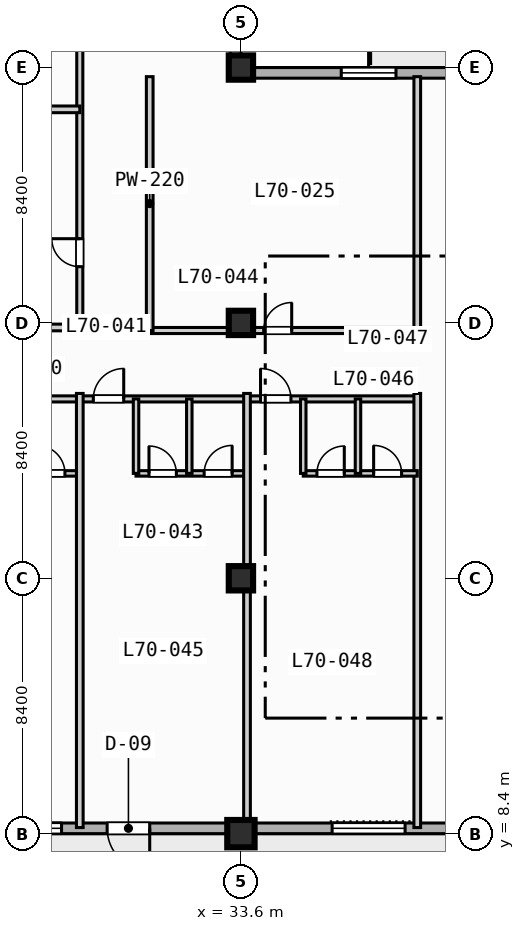
"""IFC4 building model, lengths in metres.
Left out: names, types, materials, properties, quantities, classifications, styles, units other than length and angle.
Written with IfcOpenShell. Run it as: python <this file> out.ifc"""

import sys

from ifc_helpers import new_model, si_unit, direction, frame, frame_2d, origin, origin_2d, place, context, subcontext, project, spatial, rectangle, extrude, element, fill, save


model = new_model("IFC4")
c1 = context("Model", 3, precision=1e-05, world=origin(), true_north=direction((0.0, 1.0)))
c2 = subcontext(c1, "Body", "Model", "MODEL_VIEW")
j1 = project(units=[si_unit("LENGTHUNIT", "METRE"), si_unit("PLANEANGLEUNIT", "RADIAN")], contexts=[c1])
p1 = place(None, origin())
s1 = spatial("IfcSite", under=j1, at=p1, CompositionType="ELEMENT")
p2 = place(p1, origin())
s2 = spatial("IfcBuilding", under=s1, at=p2, CompositionType="ELEMENT")
p3 = place(p2, frame((0.0, 0.0, 282.3)))
s3 = spatial("IfcBuildingStorey", under=s2, at=p3, CompositionType="ELEMENT", Elevation=282.3)
p4 = place(p3, frame((33.6, 8.4, 0.0), z_axis=(0.0, 0.0, 1.0), x_axis=(1.0, 0.0, 0.0)))
e1 = element("IfcColumn", 1, at=p4, inside=s3, PredefinedType="COLUMN", context=c2, shape_type="SweptSolid", body=[
    extrude(rectangle(XDim=0.9, YDim=0.9, at=origin_2d()), origin(), (0.0, 0.0, 1.0), 3.7),
])
for number, where, z_axis, x_axis in (
    (2, (33.6, 16.8, 0.0), (0.0, 0.0, 1.0), (1.0, 0.0, 0.0)),
    (3, (33.6, 25.2, 0.0), (0.0, 0.0, 1.0), (1.0, 0.0, 0.0)),
    (4, (33.6, 33.6, 0.0), (0.0, 0.0, 1.0), (1.0, 0.0, 0.0)),
):
    element("IfcColumn", number, at=place(p3, frame(where, z_axis=z_axis, x_axis=x_axis)), inside=s3, PredefinedType="COLUMN", context=c2, shape_type="SweptSolid", body=[
        extrude(rectangle(XDim=0.8, YDim=0.8, at=origin_2d()), origin(), (0.0, 0.0, 1.0), 3.7),
    ])
p5 = place(p3, frame((33.425, 72.425, 0.0), z_axis=(0.0, 0.0, 1.0), x_axis=(0.0, -1.0, 0.0)))
e5 = element("IfcWall", 5, at=p5, inside=s3, PredefinedType="STANDARD", context=c2, shape_type="SweptSolid", body=[
    extrude(rectangle(XDim=39.0, YDim=0.35, at=frame_2d((19.5, 0.0))), origin(), (0.0, 0.0, 1.0), 3.47),
])
p6 = place(p5, frame((5.9, 0.0, 0.85)))
e6 = element("IfcOpeningElement", 6, at=p6, cuts=e5, PredefinedType="OPENING", context=c2, shape_type="SweptSolid", body=[
    extrude(rectangle(XDim=1.8, YDim=1.8, at=frame_2d((0.9, 0.9))), frame((0.0, 0.185, 0.0), z_axis=(0.0, -1.0, 0.0), x_axis=(1.0, 0.0, 0.0)), (0.0, 0.0, 1.0), 0.37),
])
p7 = place(p3, frame((33.425, 33.425, 0.0), z_axis=(0.0, 0.0, 1.0), x_axis=(1.0, 0.0, 0.0)))
e7 = element("IfcWall", 7, at=p7, inside=s3, PredefinedType="STANDARD", context=c2, shape_type="SweptSolid", body=[
    extrude(rectangle(XDim=39.0, YDim=0.35, at=frame_2d((19.5, 0.0))), origin(), (0.0, 0.0, 1.0), 3.47),
])
p8 = place(p7, frame((12.075, 0.0, 0.0)))
e8 = element("IfcOpeningElement", 8, at=p8, cuts=e7, PredefinedType="OPENING", context=c2, shape_type="SweptSolid", body=[
    extrude(rectangle(XDim=1.4, YDim=2.2, at=frame_2d((0.7, 1.1))), frame((0.0, 0.185, 0.0), z_axis=(0.0, -1.0, 0.0), x_axis=(1.0, 0.0, 0.0)), (0.0, 0.0, 1.0), 0.37),
])
p9 = place(p7, frame((3.475, 0.0, 0.85)))
e9 = element("IfcOpeningElement", 9, at=p9, cuts=e7, PredefinedType="OPENING", context=c2, shape_type="SweptSolid", body=[
    extrude(rectangle(XDim=1.8, YDim=1.8, at=frame_2d((0.9, 0.9))), frame((0.0, 0.185, 0.0), z_axis=(0.0, -1.0, 0.0), x_axis=(1.0, 0.0, 0.0)), (0.0, 0.0, 1.0), 0.37),
])
p10 = place(p3, frame((72.425, 8.575, 0.0), z_axis=(0.0, 0.0, 1.0), x_axis=(-1.0, 0.0, 0.0)))
e10 = element("IfcWall", 10, at=p10, inside=s3, PredefinedType="STANDARD", context=c2, shape_type="SweptSolid", body=[
    extrude(rectangle(XDim=60.85, YDim=0.35, at=frame_2d((30.425, 0.0))), origin(), (0.0, 0.0, 1.0), 3.47),
])
p11 = place(p10, frame((41.825, 0.0, 0.0)))
e11 = element("IfcOpeningElement", 11, at=p11, cuts=e10, PredefinedType="OPENING", context=c2, shape_type="SweptSolid", body=[
    extrude(rectangle(XDim=1.4, YDim=2.2, at=frame_2d((0.7, 1.1))), frame((0.0, 0.185, 0.0), z_axis=(0.0, -1.0, 0.0), x_axis=(1.0, 0.0, 0.0)), (0.0, 0.0, 1.0), 0.37),
])
p12 = place(p10, frame((50.225, 0.0, 0.85)))
e12 = element("IfcOpeningElement", 12, at=p12, cuts=e10, PredefinedType="OPENING", context=c2, shape_type="SweptSolid", body=[
    extrude(rectangle(XDim=2.4, YDim=1.95, at=frame_2d((1.2, 0.975))), frame((0.0, 0.185, 0.0), z_axis=(0.0, -1.0, 0.0), x_axis=(1.0, 0.0, 0.0)), (0.0, 0.0, 1.0), 0.37),
])
p13 = place(p10, frame((33.425, 0.0, 0.85)))
e13 = element("IfcOpeningElement", 13, at=p13, cuts=e10, PredefinedType="OPENING", context=c2, shape_type="SweptSolid", body=[
    extrude(rectangle(XDim=2.4, YDim=1.95, at=frame_2d((1.2, 0.975))), frame((0.0, 0.185, 0.0), z_axis=(0.0, -1.0, 0.0), x_axis=(1.0, 0.0, 0.0)), (0.0, 0.0, 1.0), 0.37),
])
p14 = place(p10, frame((25.325, 0.0, 0.85)))
e14 = element("IfcOpeningElement", 14, at=p14, cuts=e10, PredefinedType="OPENING", context=c2, shape_type="SweptSolid", body=[
    extrude(rectangle(XDim=1.8, YDim=1.8, at=frame_2d((0.9, 0.9))), frame((0.0, 0.185, 0.0), z_axis=(0.0, -1.0, 0.0), x_axis=(1.0, 0.0, 0.0)), (0.0, 0.0, 1.0), 0.37),
])
p15 = place(p10, frame((56.975, 0.0, 0.85)))
e15 = element("IfcOpeningElement", 15, at=p15, cuts=e10, PredefinedType="OPENING", context=c2, shape_type="SweptSolid", body=[
    extrude(rectangle(XDim=1.8, YDim=1.8, at=frame_2d((0.9, 0.9))), frame((0.0, 0.185, 0.0), z_axis=(0.0, -1.0, 0.0), x_axis=(1.0, 0.0, 0.0)), (0.0, 0.0, 1.0), 0.37),
])
p16 = place(p10, frame((44.725, 0.0, 0.85)))
e16 = element("IfcOpeningElement", 16, at=p16, cuts=e10, PredefinedType="OPENING", context=c2, shape_type="SweptSolid", body=[
    extrude(rectangle(XDim=1.8, YDim=1.8, at=frame_2d((0.9, 0.9))), frame((0.0, 0.185, 0.0), z_axis=(0.0, -1.0, 0.0), x_axis=(1.0, 0.0, 0.0)), (0.0, 0.0, 1.0), 0.37),
])
p17 = place(p3, frame((30.6, 24.95, 0.0), z_axis=(0.0, 0.0, 1.0), x_axis=(1.0, 0.0, 0.0)))
e17 = element("IfcWall", 17, at=p17, inside=s3, PredefinedType="PARTITIONING", context=c2, shape_type="SweptSolid", body=[
    extrude(rectangle(XDim=8.8, YDim=0.2, at=frame_2d((4.4, 0.0))), origin(), (0.0, 0.0, 1.0), 2.87),
])
p18 = place(p17, frame((3.75, 0.0, 0.0)))
e18 = element("IfcOpeningElement", 18, at=p18, cuts=e17, PredefinedType="OPENING", context=c2, shape_type="SweptSolid", body=[
    extrude(rectangle(XDim=0.92, YDim=2.1, at=frame_2d((0.46, 1.05))), frame((0.0, 0.11, 0.0), z_axis=(0.0, -1.0, 0.0), x_axis=(1.0, 0.0, 0.0)), (0.0, 0.0, 1.0), 0.22),
])
for number, where, z_axis, x_axis in (
    (19, (30.6, 24.95, 0.0), (0.0, 0.0, 1.0), (0.0, 1.0, 0.0)),
    (20, (39.4, 24.95, 0.0), (0.0, 0.0, 1.0), (0.0, 1.0, 0.0)),
):
    element("IfcWall", number, at=place(p3, frame(where, z_axis=z_axis, x_axis=x_axis)), inside=s3, PredefinedType="PARTITIONING", context=c2, shape_type="SweptSolid", body=[
        extrude(rectangle(XDim=8.35, YDim=0.22, at=frame_2d((4.175, 0.0))), origin(), (0.0, 0.0, 1.0), 3.47),
    ])
p19 = place(p3, frame((11.8, 22.7, 0.0), z_axis=(0.0, 0.0, 1.0), x_axis=(1.0, 0.0, 0.0)))
e21 = element("IfcWall", 21, at=p19, inside=s3, PredefinedType="PARTITIONING", context=c2, shape_type="SweptSolid", body=[
    extrude(rectangle(XDim=27.6, YDim=0.2, at=frame_2d((13.8, 0.0))), origin(), (0.0, 0.0, 1.0), 3.47),
])
p20 = place(p19, frame((0.445, 0.0, 0.0)))
e22 = element("IfcOpeningElement", 22, at=p20, cuts=e21, PredefinedType="OPENING", context=c2, shape_type="SweptSolid", body=[
    extrude(rectangle(XDim=1.0, YDim=2.15, at=frame_2d((0.5, 1.075))), frame((0.0, 0.11, 0.0), z_axis=(0.0, -1.0, 0.0), x_axis=(1.0, 0.0, 0.0)), (0.0, 0.0, 1.0), 0.22),
])
p21 = place(p19, frame((5.945, 0.0, 0.0)))
e23 = element("IfcOpeningElement", 23, at=p21, cuts=e21, PredefinedType="OPENING", context=c2, shape_type="SweptSolid", body=[
    extrude(rectangle(XDim=1.0, YDim=2.15, at=frame_2d((0.5, 1.075))), frame((0.0, 0.11, 0.0), z_axis=(0.0, -1.0, 0.0), x_axis=(1.0, 0.0, 0.0)), (0.0, 0.0, 1.0), 0.22),
])
p22 = place(p19, frame((11.445, 0.0, 0.0)))
e24 = element("IfcOpeningElement", 24, at=p22, cuts=e21, PredefinedType="OPENING", context=c2, shape_type="SweptSolid", body=[
    extrude(rectangle(XDim=1.0, YDim=2.15, at=frame_2d((0.5, 1.075))), frame((0.0, 0.11, 0.0), z_axis=(0.0, -1.0, 0.0), x_axis=(1.0, 0.0, 0.0)), (0.0, 0.0, 1.0), 0.22),
])
p23 = place(p19, frame((16.945, 0.0, 0.0)))
e25 = element("IfcOpeningElement", 25, at=p23, cuts=e21, PredefinedType="OPENING", context=c2, shape_type="SweptSolid", body=[
    extrude(rectangle(XDim=1.0, YDim=2.15, at=frame_2d((0.5, 1.075))), frame((0.0, 0.11, 0.0), z_axis=(0.0, -1.0, 0.0), x_axis=(1.0, 0.0, 0.0)), (0.0, 0.0, 1.0), 0.22),
])
p24 = place(p19, frame((22.445, 0.0, 0.0)))
e26 = element("IfcOpeningElement", 26, at=p24, cuts=e21, PredefinedType="OPENING", context=c2, shape_type="SweptSolid", body=[
    extrude(rectangle(XDim=1.0, YDim=2.15, at=frame_2d((0.5, 1.075))), frame((0.0, 0.11, 0.0), z_axis=(0.0, -1.0, 0.0), x_axis=(1.0, 0.0, 0.0)), (0.0, 0.0, 1.0), 0.22),
])
p25 = place(p3, frame((24.65, 20.25, 0.0), z_axis=(0.0, 0.0, 1.0), x_axis=(1.0, 0.0, 0.0)))
e27 = element("IfcWall", 27, at=p25, inside=s3, PredefinedType="PLUMBINGWALL", context=c2, shape_type="SweptSolid", body=[
    extrude(rectangle(XDim=3.65, YDim=0.18, at=frame_2d((1.825, 0.0))), origin(), (0.0, 0.0, 1.0), 3.47),
])
p26 = place(p25, frame((0.426, 0.0, 0.0)))
e28 = element("IfcOpeningElement", 28, at=p26, cuts=e27, PredefinedType="OPENING", context=c2, shape_type="SweptSolid", body=[
    extrude(rectangle(XDim=0.9, YDim=2.1, at=frame_2d((0.45, 1.05))), frame((0.0, 0.1, 0.0), z_axis=(0.0, -1.0, 0.0), x_axis=(1.0, 0.0, 0.0)), (0.0, 0.0, 1.0), 0.2),
])
p27 = place(p25, frame((2.241, 0.0, 0.0)))
e29 = element("IfcOpeningElement", 29, at=p27, cuts=e27, PredefinedType="OPENING", context=c2, shape_type="SweptSolid", body=[
    extrude(rectangle(XDim=0.92, YDim=2.1, at=frame_2d((0.46, 1.05))), frame((0.0, 0.1, 0.0), z_axis=(0.0, -1.0, 0.0), x_axis=(1.0, 0.0, 0.0)), (0.0, 0.0, 1.0), 0.2),
])
p28 = place(p3, frame((28.3, 8.6, 0.0), z_axis=(0.0, 0.0, 1.0), x_axis=(0.0, 1.0, 0.0)))
e30 = element("IfcWall", 30, at=p28, inside=s3, PredefinedType="PARTITIONING", context=c2, shape_type="SweptSolid", body=[
    extrude(rectangle(XDim=14.28, YDim=0.22, at=frame_2d((7.14, 0.0))), origin(), (0.0, 0.0, 1.0), 3.47),
])
p29 = place(p3, frame((30.15, 20.25, 0.0), z_axis=(0.0, 0.0, 1.0), x_axis=(1.0, 0.0, 0.0)))
e31 = element("IfcWall", 31, at=p29, inside=s3, PredefinedType="PLUMBINGWALL", context=c2, shape_type="SweptSolid", body=[
    extrude(rectangle(XDim=3.65, YDim=0.18, at=frame_2d((1.825, 0.0))), origin(), (0.0, 0.0, 1.0), 3.47),
])
p30 = place(p29, frame((0.426, 0.0, 0.0)))
e32 = element("IfcOpeningElement", 32, at=p30, cuts=e31, PredefinedType="OPENING", context=c2, shape_type="SweptSolid", body=[
    extrude(rectangle(XDim=0.9, YDim=2.1, at=frame_2d((0.45, 1.05))), frame((0.0, 0.1, 0.0), z_axis=(0.0, -1.0, 0.0), x_axis=(1.0, 0.0, 0.0)), (0.0, 0.0, 1.0), 0.2),
])
p31 = place(p29, frame((2.241, 0.0, 0.0)))
e33 = element("IfcOpeningElement", 33, at=p31, cuts=e31, PredefinedType="OPENING", context=c2, shape_type="SweptSolid", body=[
    extrude(rectangle(XDim=0.92, YDim=2.1, at=frame_2d((0.46, 1.05))), frame((0.0, 0.1, 0.0), z_axis=(0.0, -1.0, 0.0), x_axis=(1.0, 0.0, 0.0)), (0.0, 0.0, 1.0), 0.2),
])
for number, where, z_axis, x_axis in (
    (34, (30.15, 20.25, 0.0), (0.0, 0.0, 1.0), (0.0, 1.0, 0.0)),
    (35, (31.902, 20.25, 0.0), (0.0, 0.0, 1.0), (0.0, 1.0, 0.0)),
):
    element("IfcWall", number, at=place(p3, frame(where, z_axis=z_axis, x_axis=x_axis)), inside=s3, PredefinedType="PLUMBINGWALL", context=c2, shape_type="SweptSolid", body=[
        extrude(rectangle(XDim=2.45, YDim=0.18, at=frame_2d((1.225, 0.0))), origin(), (0.0, 0.0, 1.0), 3.47),
    ])
p32 = place(p3, frame((33.8, 8.6, 0.0), z_axis=(0.0, 0.0, 1.0), x_axis=(0.0, 1.0, 0.0)))
e36 = element("IfcWall", 36, at=p32, inside=s3, PredefinedType="PARTITIONING", context=c2, shape_type="SweptSolid", body=[
    extrude(rectangle(XDim=14.28, YDim=0.22, at=frame_2d((7.14, 0.0))), origin(), (0.0, 0.0, 1.0), 2.87),
])
p33 = place(p3, frame((39.4, 8.6, 0.0), z_axis=(0.0, 0.0, 1.0), x_axis=(0.0, 1.0, 0.0)))
e37 = element("IfcWall", 37, at=p33, inside=s3, PredefinedType="PARTITIONING", context=c2, shape_type="SweptSolid", body=[
    extrude(rectangle(XDim=14.28, YDim=0.22, at=frame_2d((7.14, 0.0))), origin(), (0.0, 0.0, 1.0), 3.47),
])
p34 = place(p3, frame((35.65, 20.25, 0.0), z_axis=(0.0, 0.0, 1.0), x_axis=(1.0, 0.0, 0.0)))
e38 = element("IfcWall", 38, at=p34, inside=s3, PredefinedType="PLUMBINGWALL", context=c2, shape_type="SweptSolid", body=[
    extrude(rectangle(XDim=3.75, YDim=0.18, at=frame_2d((1.875, 0.0))), origin(), (0.0, 0.0, 1.0), 3.47),
])
p35 = place(p34, frame((0.45, 0.0, 0.0)))
e39 = element("IfcOpeningElement", 39, at=p35, cuts=e38, PredefinedType="OPENING", context=c2, shape_type="SweptSolid", body=[
    extrude(rectangle(XDim=0.9, YDim=2.1, at=frame_2d((0.45, 1.05))), frame((0.0, 0.1, 0.0), z_axis=(0.0, -1.0, 0.0), x_axis=(1.0, 0.0, 0.0)), (0.0, 0.0, 1.0), 0.2),
])
p36 = place(p34, frame((2.315, 0.0, 0.0)))
e40 = element("IfcOpeningElement", 40, at=p36, cuts=e38, PredefinedType="OPENING", context=c2, shape_type="SweptSolid", body=[
    extrude(rectangle(XDim=0.92, YDim=2.1, at=frame_2d((0.46, 1.05))), frame((0.0, 0.1, 0.0), z_axis=(0.0, -1.0, 0.0), x_axis=(1.0, 0.0, 0.0)), (0.0, 0.0, 1.0), 0.2),
])
for number, where, z_axis, x_axis in (
    (41, (35.65, 20.25, 0.0), (0.0, 0.0, 1.0), (0.0, 1.0, 0.0)),
    (42, (37.45, 20.25, 0.0), (0.0, 0.0, 1.0), (0.0, 1.0, 0.0)),
):
    element("IfcWall", number, at=place(p3, frame(where, z_axis=z_axis, x_axis=x_axis)), inside=s3, PredefinedType="PLUMBINGWALL", context=c2, shape_type="SweptSolid", body=[
        extrude(rectangle(XDim=2.45, YDim=0.18, at=frame_2d((1.225, 0.0))), origin(), (0.0, 0.0, 1.0), 3.47),
    ])
p37 = place(p3, frame((28.3, 25.05, 0.0), z_axis=(0.0, 0.0, 1.0), x_axis=(0.0, 1.0, 0.0)))
e43 = element("IfcWall", 43, at=p37, inside=s3, PredefinedType="PARTITIONING", context=c2, shape_type="SweptSolid", body=[
    extrude(rectangle(XDim=14.35, YDim=0.2, at=frame_2d((7.175, 0.0))), origin(), (0.0, 0.0, 1.0), 3.47),
])
p38 = place(p37, frame((2.0, 0.0, 0.0)))
e44 = element("IfcOpeningElement", 44, at=p38, cuts=e43, PredefinedType="OPENING", context=c2, shape_type="SweptSolid", body=[
    extrude(rectangle(XDim=0.92, YDim=2.1, at=frame_2d((0.46, 1.05))), frame((0.0, 0.11, 0.0), z_axis=(0.0, -1.0, 0.0), x_axis=(1.0, 0.0, 0.0)), (0.0, 0.0, 1.0), 0.22),
])
p39 = place(p37, frame((9.175, 0.0, 0.0)))
e45 = element("IfcOpeningElement", 45, at=p39, cuts=e43, PredefinedType="OPENING", context=c2, shape_type="SweptSolid", body=[
    extrude(rectangle(XDim=0.92, YDim=2.1, at=frame_2d((0.46, 1.05))), frame((0.0, 0.11, 0.0), z_axis=(0.0, -1.0, 0.0), x_axis=(1.0, 0.0, 0.0)), (0.0, 0.0, 1.0), 0.22),
])
p40 = place(p3, frame((8.7, 25.05, 0.0), z_axis=(0.0, 0.0, 1.0), x_axis=(1.0, 0.0, 0.0)))
e46 = element("IfcWall", 46, at=p40, inside=s3, PredefinedType="PARTITIONING", context=c2, shape_type="SweptSolid", body=[
    extrude(rectangle(XDim=19.6, YDim=0.22, at=frame_2d((9.8, 0.0))), origin(), (0.0, 0.0, 1.0), 2.87),
])
p41 = place(p3, frame((8.7, 32.225, 0.0), z_axis=(0.0, 0.0, 1.0), x_axis=(1.0, 0.0, 0.0)))
e47 = element("IfcWall", 47, at=p41, inside=s3, PredefinedType="PARTITIONING", context=c2, shape_type="SweptSolid", body=[
    extrude(rectangle(XDim=19.6, YDim=0.22, at=frame_2d((9.8, 0.0))), origin(), (0.0, 0.0, 1.0), 3.47),
])
p42 = place(p9, origin())
e48 = element("IfcWindow", 48, at=p42, inside=s3, PartitioningType="SINGLE_PANEL", PredefinedType="WINDOW", context=c2, shape_type="SweptSolid", body=[
    extrude(rectangle(XDim=1.8, YDim=1.8, at=frame_2d((0.9, 0.9))), frame((0.0, 0.03, 0.0), z_axis=(0.0, -1.0, 0.0), x_axis=(1.0, 0.0, 0.0)), (0.0, 0.0, 1.0), 0.06),
])
fill(e9, e48)
p43 = place(p11, origin())
e49 = element("IfcDoor", 49, at=p43, inside=s3, OperationType="SINGLE_SWING_LEFT", PredefinedType="DOOR", context=c2, shape_type="SweptSolid", body=[
    extrude(rectangle(XDim=1.4, YDim=2.2, at=frame_2d((0.7, 1.1))), frame((0.0, 0.025, 0.0), z_axis=(0.0, -1.0, 0.0), x_axis=(1.0, 0.0, 0.0)), (0.0, 0.0, 1.0), 0.05),
])
fill(e11, e49)
p44 = place(p13, origin())
e50 = element("IfcWindow", 50, at=p44, inside=s3, PartitioningType="SINGLE_PANEL", PredefinedType="WINDOW", context=c2, shape_type="SweptSolid", body=[
    extrude(rectangle(XDim=2.4, YDim=1.95, at=frame_2d((1.2, 0.975))), frame((0.0, 0.03, 0.0), z_axis=(0.0, -1.0, 0.0), x_axis=(1.0, 0.0, 0.0)), (0.0, 0.0, 1.0), 0.06),
])
fill(e13, e50)
p45 = place(p16, origin())
e51 = element("IfcWindow", 51, at=p45, inside=s3, PartitioningType="SINGLE_PANEL", PredefinedType="WINDOW", context=c2, shape_type="SweptSolid", body=[
    extrude(rectangle(XDim=1.8, YDim=1.8, at=frame_2d((0.9, 0.9))), frame((0.0, 0.03, 0.0), z_axis=(0.0, -1.0, 0.0), x_axis=(1.0, 0.0, 0.0)), (0.0, 0.0, 1.0), 0.06),
])
fill(e16, e51)
p46 = place(p18, origin())
e52 = element("IfcDoor", 52, at=p46, inside=s3, OperationType="SINGLE_SWING_RIGHT", PredefinedType="DOOR", context=c2, shape_type="SweptSolid", body=[
    extrude(rectangle(XDim=0.92, YDim=2.1, at=frame_2d((0.46, 1.05))), frame((0.0, 0.025, 0.0), z_axis=(0.0, -1.0, 0.0), x_axis=(1.0, 0.0, 0.0)), (0.0, 0.0, 1.0), 0.05),
])
fill(e18, e52)
p47 = place(p23, origin())
e53 = element("IfcDoor", 53, at=p47, inside=s3, OperationType="SINGLE_SWING_RIGHT", PredefinedType="DOOR", context=c2, shape_type="SweptSolid", body=[
    extrude(rectangle(XDim=1.0, YDim=2.15, at=frame_2d((0.5, 1.075))), frame((0.0, 0.025, 0.0), z_axis=(0.0, -1.0, 0.0), x_axis=(1.0, 0.0, 0.0)), (0.0, 0.0, 1.0), 0.05),
])
fill(e25, e53)
p48 = place(p24, origin())
e54 = element("IfcDoor", 54, at=p48, inside=s3, OperationType="SINGLE_SWING_LEFT", PredefinedType="DOOR", context=c2, shape_type="SweptSolid", body=[
    extrude(rectangle(XDim=1.0, YDim=2.15, at=frame_2d((0.5, 1.075))), frame((0.0, 0.025, 0.0), z_axis=(0.0, -1.0, 0.0), x_axis=(1.0, 0.0, 0.0)), (0.0, 0.0, 1.0), 0.05),
])
fill(e26, e54)
p49 = place(p27, origin())
e55 = element("IfcDoor", 55, at=p49, inside=s3, OperationType="SINGLE_SWING_LEFT", PredefinedType="DOOR", context=c2, shape_type="SweptSolid", body=[
    extrude(rectangle(XDim=0.92, YDim=2.1, at=frame_2d((0.46, 1.05))), frame((0.0, 0.025, 0.0), z_axis=(0.0, -1.0, 0.0), x_axis=(1.0, 0.0, 0.0)), (0.0, 0.0, 1.0), 0.05),
])
fill(e29, e55)
p50 = place(p30, origin())
e56 = element("IfcDoor", 56, at=p50, inside=s3, OperationType="SINGLE_SWING_LEFT", PredefinedType="DOOR", context=c2, shape_type="SweptSolid", body=[
    extrude(rectangle(XDim=0.9, YDim=2.1, at=frame_2d((0.45, 1.05))), frame((0.0, 0.025, 0.0), z_axis=(0.0, -1.0, 0.0), x_axis=(1.0, 0.0, 0.0)), (0.0, 0.0, 1.0), 0.05),
])
fill(e32, e56)
p51 = place(p31, origin())
e57 = element("IfcDoor", 57, at=p51, inside=s3, OperationType="SINGLE_SWING_RIGHT", PredefinedType="DOOR", context=c2, shape_type="SweptSolid", body=[
    extrude(rectangle(XDim=0.92, YDim=2.1, at=frame_2d((0.46, 1.05))), frame((0.0, 0.025, 0.0), z_axis=(0.0, -1.0, 0.0), x_axis=(1.0, 0.0, 0.0)), (0.0, 0.0, 1.0), 0.05),
])
fill(e33, e57)
p52 = place(p35, origin())
e58 = element("IfcDoor", 58, at=p52, inside=s3, OperationType="SINGLE_SWING_RIGHT", PredefinedType="DOOR", context=c2, shape_type="SweptSolid", body=[
    extrude(rectangle(XDim=0.9, YDim=2.1, at=frame_2d((0.45, 1.05))), frame((0.0, 0.025, 0.0), z_axis=(0.0, -1.0, 0.0), x_axis=(1.0, 0.0, 0.0)), (0.0, 0.0, 1.0), 0.05),
])
fill(e39, e58)
p53 = place(p36, origin())
e59 = element("IfcDoor", 59, at=p53, inside=s3, OperationType="SINGLE_SWING_LEFT", PredefinedType="DOOR", context=c2, shape_type="SweptSolid", body=[
    extrude(rectangle(XDim=0.92, YDim=2.1, at=frame_2d((0.46, 1.05))), frame((0.0, 0.025, 0.0), z_axis=(0.0, -1.0, 0.0), x_axis=(1.0, 0.0, 0.0)), (0.0, 0.0, 1.0), 0.05),
])
fill(e40, e59)
p54 = place(p38, origin())
e60 = element("IfcDoor", 60, at=p54, inside=s3, OperationType="SINGLE_SWING_RIGHT", PredefinedType="DOOR", context=c2, shape_type="SweptSolid", body=[
    extrude(rectangle(XDim=0.92, YDim=2.1, at=frame_2d((0.46, 1.05))), frame((0.0, 0.025, 0.0), z_axis=(0.0, -1.0, 0.0), x_axis=(1.0, 0.0, 0.0)), (0.0, 0.0, 1.0), 0.05),
])
fill(e44, e60)
save(model, sys.argv[1])
